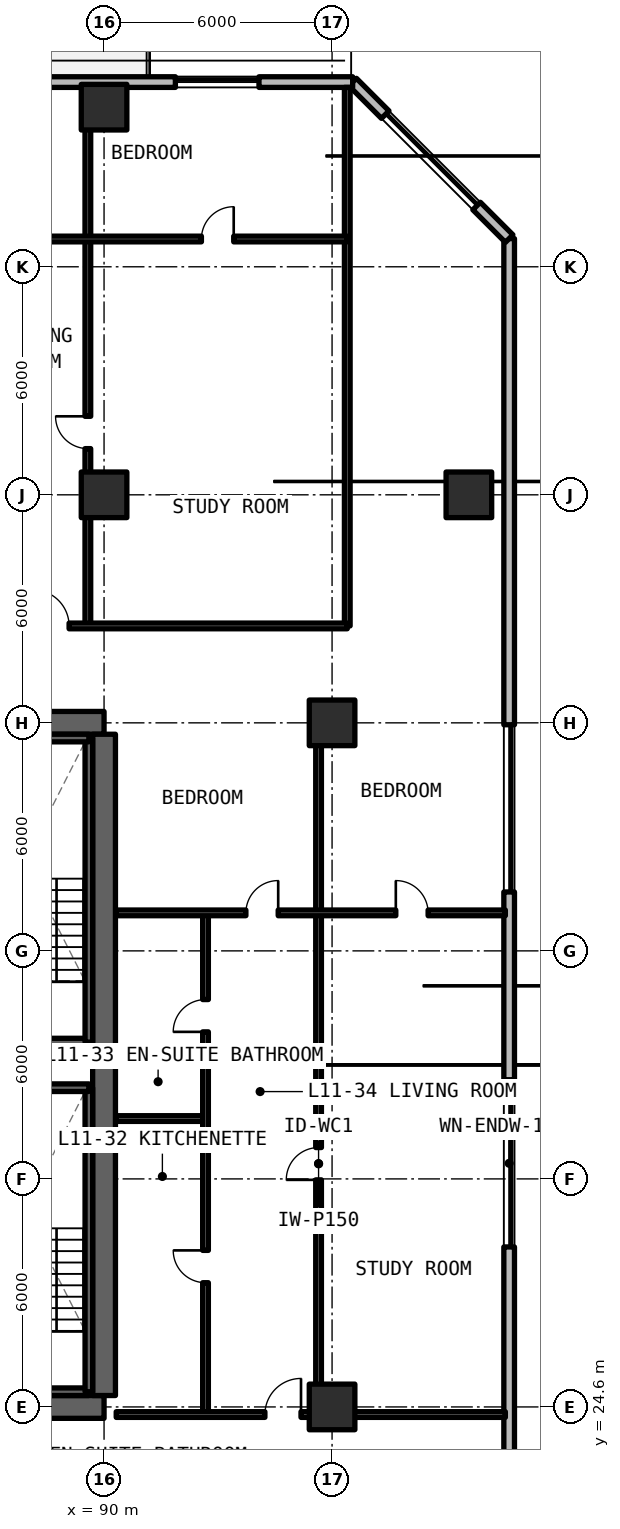
"""IFC4 building model, lengths in metres.
Left out: names, types, materials, properties, quantities, classifications, styles, units other than length and angle.
Written with IfcOpenShell. Run it as: python <this file> out.ifc"""

import sys

from ifc_helpers import new_model, si_unit, direction, frame, frame_2d, origin, origin_2d, place, context, subcontext, project, spatial, rectangle, extrude, element, fill, save


model = new_model("IFC4")
c1 = context("Model", 3, precision=1e-05, world=origin(), true_north=direction((0.0, 1.0)))
c2 = subcontext(c1, "Body", "Model", "MODEL_VIEW")
j1 = project(units=[si_unit("LENGTHUNIT", "METRE"), si_unit("PLANEANGLEUNIT", "RADIAN")], contexts=[c1])
p1 = place(None, origin())
s1 = spatial("IfcSite", under=j1, at=p1, CompositionType="ELEMENT")
p2 = place(p1, origin())
s2 = spatial("IfcBuilding", under=s1, at=p2, CompositionType="ELEMENT")
p3 = place(p2, frame((0.0, 0.0, 42.24)))
s3 = spatial("IfcBuildingStorey", under=s2, at=p3, CompositionType="ELEMENT", Elevation=42.24)
for number, where, z_axis, x_axis in (
    (1, (78.0, 24.6, 0.0), (0.0, 0.0, 1.0), (1.0, 0.0, 0.0)),
    (2, (90.0, 42.6, 0.0), (0.0, 0.0, 1.0), (-1.0, 0.0, 0.0)),
):
    element("IfcWall", number, at=place(p3, frame(where, z_axis=z_axis, x_axis=x_axis)), inside=s3, PredefinedType="SHEAR", context=c2, shape_type="SweptSolid", body=[
        extrude(rectangle(XDim=12.0, YDim=0.6, at=frame_2d((6.0, 0.0))), origin(), (0.0, 0.0, 1.0), 3.3),
    ])
p4 = place(p3, frame((90.0, 24.9, 0.0), z_axis=(0.0, 0.0, 1.0), x_axis=(0.0, 1.0, 0.0)))
e3 = element("IfcWall", 3, at=p4, inside=s3, PredefinedType="SHEAR", context=c2, shape_type="SweptSolid", body=[
    extrude(rectangle(XDim=17.4, YDim=0.6, at=frame_2d((8.7, 0.0))), origin(), (0.0, 0.0, 1.0), 3.3),
])
for number, where, z_axis, x_axis in (
    (4, (96.0, 24.6, 0.0), (0.0, 0.0, 1.0), (1.0, 0.0, 0.0)),
    (5, (96.0, 42.6, 0.0), (0.0, 0.0, 1.0), (1.0, 0.0, 0.0)),
    (6, (90.0, 48.6, 0.0), (0.0, 0.0, 1.0), (1.0, 0.0, 0.0)),
    (7, (99.6, 48.6, 0.0), (0.0, 0.0, 1.0), (1.0, 0.0, 0.0)),
    (8, (90.0, 58.8, 0.0), (0.0, 0.0, 1.0), (1.0, 0.0, 0.0)),
):
    element("IfcColumn", number, at=place(p3, frame(where, z_axis=z_axis, x_axis=x_axis)), inside=s3, PredefinedType="COLUMN", context=c2, shape_type="SweptSolid", body=[
        extrude(rectangle(XDim=1.2, YDim=1.2, at=origin_2d()), origin(), (0.0, 0.0, 1.0), 3.3),
    ])
p5 = place(p3, frame((100.66, 11.858, 0.0), z_axis=(0.0, 0.0, 1.0), x_axis=(0.0, 1.0, 0.0)))
e9 = element("IfcWall", 9, at=p5, inside=s3, PredefinedType="SOLIDWALL", context=c2, shape_type="SweptSolid", body=[
    extrude(rectangle(XDim=43.484, YDim=0.28, at=frame_2d((21.742, 0.0))), origin(), (0.0, 0.0, 1.0), 3.08),
])
p6 = place(p5, frame((16.952, 0.0, 0.78)))
e10 = element("IfcOpeningElement", 10, at=p6, cuts=e9, PredefinedType="OPENING", context=c2, shape_type="SweptSolid", body=[
    extrude(rectangle(XDim=4.4, YDim=1.66, at=frame_2d((2.2, 0.83))), frame((0.0, 0.15, 0.0), z_axis=(0.0, -1.0, 0.0), x_axis=(1.0, 0.0, 0.0)), (0.0, 0.0, 1.0), 0.3),
])
p7 = place(p5, frame((26.292, 0.0, 0.78)))
e11 = element("IfcOpeningElement", 11, at=p7, cuts=e9, PredefinedType="OPENING", context=c2, shape_type="SweptSolid", body=[
    extrude(rectangle(XDim=4.4, YDim=1.66, at=frame_2d((2.2, 0.83))), frame((0.0, 0.15, 0.0), z_axis=(0.0, -1.0, 0.0), x_axis=(1.0, 0.0, 0.0)), (0.0, 0.0, 1.0), 0.3),
])
p8 = place(p5, frame((1.511, 0.0, 0.78)))
e12 = element("IfcOpeningElement", 12, at=p8, cuts=e9, PredefinedType="OPENING", context=c2, shape_type="SweptSolid", body=[
    extrude(rectangle(XDim=4.4, YDim=1.66, at=frame_2d((2.2, 0.83))), frame((0.0, 0.15, 0.0), z_axis=(0.0, -1.0, 0.0), x_axis=(1.0, 0.0, 0.0)), (0.0, 0.0, 1.0), 0.3),
])
p9 = place(p3, frame((100.66, 55.342, 0.0), z_axis=(0.0, 0.0, 1.0), x_axis=(-0.707106781187, 0.707106781187, 0.0)))
e13 = element("IfcWall", 13, at=p9, inside=s3, PredefinedType="SOLIDWALL", context=c2, shape_type="SweptSolid", body=[
    extrude(rectangle(XDim=5.824, YDim=0.28, at=frame_2d((2.912, 0.0))), origin(), (0.0, 0.0, 1.0), 3.08),
])
p10 = place(p9, frame((1.212, 0.0, 0.78)))
e14 = element("IfcOpeningElement", 14, at=p10, cuts=e13, PredefinedType="OPENING", context=c2, shape_type="SweptSolid", body=[
    extrude(rectangle(XDim=3.4, YDim=1.66, at=frame_2d((1.7, 0.83))), frame((0.0, 0.15, 0.0), z_axis=(0.0, -1.0, 0.0), x_axis=(1.0, 0.0, 0.0)), (0.0, 0.0, 1.0), 0.3),
])
p11 = place(p3, frame((96.542, 59.46, 0.0), z_axis=(0.0, 0.0, 1.0), x_axis=(-1.0, 0.0, 0.0)))
e15 = element("IfcWall", 15, at=p11, inside=s3, PredefinedType="SOLIDWALL", context=c2, shape_type="SweptSolid", body=[
    extrude(rectangle(XDim=44.402, YDim=0.28, at=frame_2d((22.201, 0.0))), origin(), (0.0, 0.0, 1.0), 3.08),
])
p12 = place(p11, frame((33.342, 0.0, 0.0)))
e16 = element("IfcOpeningElement", 16, at=p12, cuts=e15, PredefinedType="OPENING", context=c2, shape_type="SweptSolid", body=[
    extrude(rectangle(XDim=1.1, YDim=2.15, at=frame_2d((0.55, 1.075))), frame((0.0, 0.15, 0.0), z_axis=(0.0, -1.0, 0.0), x_axis=(1.0, 0.0, 0.0)), (0.0, 0.0, 1.0), 0.3),
])
p13 = place(p11, frame((20.992, 0.0, 0.0)))
e17 = element("IfcOpeningElement", 17, at=p13, cuts=e15, PredefinedType="OPENING", context=c2, shape_type="SweptSolid", body=[
    extrude(rectangle(XDim=1.1, YDim=2.15, at=frame_2d((0.55, 1.075))), frame((0.0, 0.15, 0.0), z_axis=(0.0, -1.0, 0.0), x_axis=(1.0, 0.0, 0.0)), (0.0, 0.0, 1.0), 0.3),
])
p14 = place(p11, frame((9.392, 0.0, 0.0)))
e18 = element("IfcOpeningElement", 18, at=p14, cuts=e15, PredefinedType="OPENING", context=c2, shape_type="SweptSolid", body=[
    extrude(rectangle(XDim=1.1, YDim=2.15, at=frame_2d((0.55, 1.075))), frame((0.0, 0.15, 0.0), z_axis=(0.0, -1.0, 0.0), x_axis=(1.0, 0.0, 0.0)), (0.0, 0.0, 1.0), 0.3),
])
p15 = place(p11, frame((31.389, 0.0, 0.78)))
e19 = element("IfcOpeningElement", 19, at=p15, cuts=e15, PredefinedType="OPENING", context=c2, shape_type="SweptSolid", body=[
    extrude(rectangle(XDim=0.85, YDim=1.65, at=frame_2d((0.425, 0.825))), frame((0.0, 0.15, 0.0), z_axis=(0.0, -1.0, 0.0), x_axis=(1.0, 0.0, 0.0)), (0.0, 0.0, 1.0), 0.3),
])
p16 = place(p11, frame((25.408, 0.0, 0.78)))
e20 = element("IfcOpeningElement", 20, at=p16, cuts=e15, PredefinedType="OPENING", context=c2, shape_type="SweptSolid", body=[
    extrude(rectangle(XDim=2.2, YDim=1.66, at=frame_2d((1.1, 0.83))), frame((0.0, 0.15, 0.0), z_axis=(0.0, -1.0, 0.0), x_axis=(1.0, 0.0, 0.0)), (0.0, 0.0, 1.0), 0.3),
])
p17 = place(p11, frame((2.465, 0.0, 0.78)))
e21 = element("IfcOpeningElement", 21, at=p17, cuts=e15, PredefinedType="OPENING", context=c2, shape_type="SweptSolid", body=[
    extrude(rectangle(XDim=2.2, YDim=1.66, at=frame_2d((1.1, 0.83))), frame((0.0, 0.15, 0.0), z_axis=(0.0, -1.0, 0.0), x_axis=(1.0, 0.0, 0.0)), (0.0, 0.0, 1.0), 0.3),
])
p18 = place(p3, frame((95.645, 24.4, 0.0), z_axis=(0.0, 0.0, 1.0), x_axis=(0.0, 1.0, 0.0)))
e22 = element("IfcWall", 22, at=p18, inside=s3, PredefinedType="PARTITIONING", context=c2, shape_type="SweptSolid", body=[
    extrude(rectangle(XDim=13.2, YDim=0.15, at=frame_2d((6.6, 0.0))), origin(), (0.0, 0.0, 1.0), 2.35),
])
p19 = place(p18, frame((6.175, 0.0, 0.0)))
e23 = element("IfcOpeningElement", 23, at=p19, cuts=e22, PredefinedType="OPENING", context=c2, shape_type="SweptSolid", body=[
    extrude(rectangle(XDim=0.85, YDim=2.1, at=frame_2d((0.425, 1.05))), frame((0.0, 0.085, 0.0), z_axis=(0.0, -1.0, 0.0), x_axis=(1.0, 0.0, 0.0)), (0.0, 0.0, 1.0), 0.17),
])
p20 = place(p3, frame((90.32, 32.188, 0.0), z_axis=(0.0, 0.0, 1.0), x_axis=(1.0, 0.0, 0.0)))
e24 = element("IfcWall", 24, at=p20, inside=s3, PredefinedType="PARTITIONING", context=c2, shape_type="SweptSolid", body=[
    extrude(rectangle(XDim=2.35, YDim=0.15, at=frame_2d((1.175, 0.0))), origin(), (0.0, 0.0, 1.0), 2.35),
])
p21 = place(p3, frame((92.67, 24.4, 0.0), z_axis=(0.0, 0.0, 1.0), x_axis=(0.0, 1.0, 0.0)))
e25 = element("IfcWall", 25, at=p21, inside=s3, PredefinedType="PARTITIONING", context=c2, shape_type="SweptSolid", body=[
    extrude(rectangle(XDim=13.2, YDim=0.15, at=frame_2d((6.6, 0.0))), origin(), (0.0, 0.0, 1.0), 2.35),
])
p22 = place(p21, frame((3.469, 0.0, 0.0)))
e26 = element("IfcOpeningElement", 26, at=p22, cuts=e25, PredefinedType="OPENING", context=c2, shape_type="SweptSolid", body=[
    extrude(rectangle(XDim=0.85, YDim=2.1, at=frame_2d((0.425, 1.05))), frame((0.0, 0.085, 0.0), z_axis=(0.0, -1.0, 0.0), x_axis=(1.0, 0.0, 0.0)), (0.0, 0.0, 1.0), 0.17),
])
p23 = place(p21, frame((10.069, 0.0, 0.0)))
e27 = element("IfcOpeningElement", 27, at=p23, cuts=e25, PredefinedType="OPENING", context=c2, shape_type="SweptSolid", body=[
    extrude(rectangle(XDim=0.85, YDim=2.1, at=frame_2d((0.425, 1.05))), frame((0.0, 0.085, 0.0), z_axis=(0.0, -1.0, 0.0), x_axis=(1.0, 0.0, 0.0)), (0.0, 0.0, 1.0), 0.17),
])
p24 = place(p3, frame((95.645, 37.6, 0.0), z_axis=(0.0, 0.0, 1.0), x_axis=(0.0, 1.0, 0.0)))
e28 = element("IfcWall", 28, at=p24, inside=s3, PredefinedType="PARTITIONING", context=c2, shape_type="SweptSolid", body=[
    extrude(rectangle(XDim=5.2, YDim=0.15, at=frame_2d((2.6, 0.0))), origin(), (0.0, 0.0, 1.0), 2.35),
])
p25 = place(p3, frame((90.32, 37.6, 0.0), z_axis=(0.0, 0.0, 1.0), x_axis=(1.0, 0.0, 0.0)))
e29 = element("IfcWall", 29, at=p25, inside=s3, PredefinedType="PARTITIONING", context=c2, shape_type="SweptSolid", body=[
    extrude(rectangle(XDim=10.24, YDim=0.15, at=frame_2d((5.12, 0.0))), origin(), (0.0, 0.0, 1.0), 2.35),
])
p26 = place(p25, frame((3.412, 0.0, 0.0)))
e30 = element("IfcOpeningElement", 30, at=p26, cuts=e29, PredefinedType="OPENING", context=c2, shape_type="SweptSolid", body=[
    extrude(rectangle(XDim=0.85, YDim=2.1, at=frame_2d((0.425, 1.05))), frame((0.0, 0.085, 0.0), z_axis=(0.0, -1.0, 0.0), x_axis=(1.0, 0.0, 0.0)), (0.0, 0.0, 1.0), 0.17),
])
p27 = place(p25, frame((7.357, 0.0, 0.0)))
e31 = element("IfcOpeningElement", 31, at=p27, cuts=e29, PredefinedType="OPENING", context=c2, shape_type="SweptSolid", body=[
    extrude(rectangle(XDim=0.85, YDim=2.1, at=frame_2d((0.425, 1.05))), frame((0.0, 0.085, 0.0), z_axis=(0.0, -1.0, 0.0), x_axis=(1.0, 0.0, 0.0)), (0.0, 0.0, 1.0), 0.17),
])
p28 = place(p3, frame((90.32, 24.4, 0.0), z_axis=(0.0, 0.0, 1.0), x_axis=(1.0, 0.0, 0.0)))
e32 = element("IfcWall", 32, at=p28, inside=s3, PredefinedType="SOLIDWALL", context=c2, shape_type="SweptSolid", body=[
    extrude(rectangle(XDim=10.24, YDim=0.15, at=frame_2d((5.12, 0.0))), origin(), (0.0, 0.0, 1.0), 2.295),
])
p29 = place(p28, frame((3.913, 0.0, 0.0)))
e33 = element("IfcOpeningElement", 33, at=p29, cuts=e32, PredefinedType="OPENING", context=c2, shape_type="SweptSolid", body=[
    extrude(rectangle(XDim=0.95, YDim=2.15, at=frame_2d((0.475, 1.075))), frame((0.0, 0.085, 0.0), z_axis=(0.0, -1.0, 0.0), x_axis=(1.0, 0.0, 0.0)), (0.0, 0.0, 1.0), 0.17),
])
p30 = place(p3, frame((96.4, 45.15, 0.0), z_axis=(0.0, 0.0, 1.0), x_axis=(0.0, 1.0, 0.0)))
e34 = element("IfcWall", 34, at=p30, inside=s3, PredefinedType="SOLIDWALL", context=c2, shape_type="SweptSolid", body=[
    extrude(rectangle(XDim=14.17, YDim=0.15, at=frame_2d((7.085, 0.0))), origin(), (0.0, 0.0, 1.0), 2.35),
])
p31 = place(p3, frame((89.574, 45.15, 0.0), z_axis=(0.0, 0.0, 1.0), x_axis=(0.0, 1.0, 0.0)))
e35 = element("IfcWall", 35, at=p31, inside=s3, PredefinedType="PARTITIONING", context=c2, shape_type="SweptSolid", body=[
    extrude(rectangle(XDim=10.181, YDim=0.15, at=frame_2d((5.09, 0.0))), origin(), (0.0, 0.0, 1.0), 2.35),
])
p32 = place(p31, frame((4.666, 0.0, 0.0)))
e36 = element("IfcOpeningElement", 36, at=p32, cuts=e35, PredefinedType="OPENING", context=c2, shape_type="SweptSolid", body=[
    extrude(rectangle(XDim=0.85, YDim=2.1, at=frame_2d((0.425, 1.05))), frame((0.0, 0.085, 0.0), z_axis=(0.0, -1.0, 0.0), x_axis=(1.0, 0.0, 0.0)), (0.0, 0.0, 1.0), 0.17),
])
p33 = place(p3, frame((89.574, 55.331, 0.0), z_axis=(0.0, 0.0, 1.0), x_axis=(0.0, 1.0, 0.0)))
e37 = element("IfcWall", 37, at=p33, inside=s3, PredefinedType="PARTITIONING", context=c2, shape_type="SweptSolid", body=[
    extrude(rectangle(XDim=3.989, YDim=0.15, at=frame_2d((1.995, 0.0))), origin(), (0.0, 0.0, 1.0), 2.35),
])
p34 = place(p3, frame((82.179, 55.331, 0.0), z_axis=(0.0, 0.0, 1.0), x_axis=(1.0, 0.0, 0.0)))
e38 = element("IfcWall", 38, at=p34, inside=s3, PredefinedType="PARTITIONING", context=c2, shape_type="SweptSolid", body=[
    extrude(rectangle(XDim=14.221, YDim=0.15, at=frame_2d((7.111, 0.0))), origin(), (0.0, 0.0, 1.0), 2.35),
])
p35 = place(p34, frame((5.143, 0.0, 0.0)))
e39 = element("IfcOpeningElement", 39, at=p35, cuts=e38, PredefinedType="OPENING", context=c2, shape_type="SweptSolid", body=[
    extrude(rectangle(XDim=0.85, YDim=2.1, at=frame_2d((0.425, 1.05))), frame((0.0, 0.085, 0.0), z_axis=(0.0, -1.0, 0.0), x_axis=(1.0, 0.0, 0.0)), (0.0, 0.0, 1.0), 0.17),
])
p36 = place(p34, frame((10.383, 0.0, 0.0)))
e40 = element("IfcOpeningElement", 40, at=p36, cuts=e38, PredefinedType="OPENING", context=c2, shape_type="SweptSolid", body=[
    extrude(rectangle(XDim=0.85, YDim=2.1, at=frame_2d((0.425, 1.05))), frame((0.0, 0.085, 0.0), z_axis=(0.0, -1.0, 0.0), x_axis=(1.0, 0.0, 0.0)), (0.0, 0.0, 1.0), 0.17),
])
p37 = place(p3, frame((82.179, 45.15, 0.0), z_axis=(0.0, 0.0, 1.0), x_axis=(1.0, 0.0, 0.0)))
e41 = element("IfcWall", 41, at=p37, inside=s3, PredefinedType="SOLIDWALL", context=c2, shape_type="SweptSolid", body=[
    extrude(rectangle(XDim=14.221, YDim=0.15, at=frame_2d((7.111, 0.0))), origin(), (0.0, 0.0, 1.0), 2.35),
])
p38 = place(p37, frame((5.951, 0.0, 0.0)))
e42 = element("IfcOpeningElement", 42, at=p38, cuts=e41, PredefinedType="OPENING", context=c2, shape_type="SweptSolid", body=[
    extrude(rectangle(XDim=0.95, YDim=2.15, at=frame_2d((0.475, 1.075))), frame((0.0, 0.085, 0.0), z_axis=(0.0, -1.0, 0.0), x_axis=(1.0, 0.0, 0.0)), (0.0, 0.0, 1.0), 0.17),
])
p39 = place(p3, frame((86.2, 25.0, 0.0), z_axis=(0.0, 0.0, 1.0), x_axis=(1.0, 0.0, 0.0)))
e43 = element("IfcWall", 43, at=p39, inside=s3, PredefinedType="SOLIDWALL", context=c2, shape_type="SweptSolid", body=[
    extrude(rectangle(XDim=3.4, YDim=0.2, at=frame_2d((1.7, 0.0))), origin(), (0.0, 0.0, 1.0), 3.3),
])
p40 = place(p3, frame((89.6, 25.0, 0.0), z_axis=(0.0, 0.0, 1.0), x_axis=(0.0, 1.0, 0.0)))
e44 = element("IfcWall", 44, at=p40, inside=s3, PredefinedType="SOLIDWALL", context=c2, shape_type="SweptSolid", body=[
    extrude(rectangle(XDim=8.0, YDim=0.2, at=frame_2d((4.0, 0.0))), origin(), (0.0, 0.0, 1.0), 3.3),
])
for number, where, z_axis, x_axis in (
    (45, (89.6, 33.0, 0.0), (0.0, 0.0, 1.0), (-1.0, 0.0, 0.0)),
    (46, (86.2, 34.2, 0.0), (0.0, 0.0, 1.0), (1.0, 0.0, 0.0)),
):
    element("IfcWall", number, at=place(p3, frame(where, z_axis=z_axis, x_axis=x_axis)), inside=s3, PredefinedType="SOLIDWALL", context=c2, shape_type="SweptSolid", body=[
        extrude(rectangle(XDim=3.4, YDim=0.2, at=frame_2d((1.7, 0.0))), origin(), (0.0, 0.0, 1.0), 3.3),
    ])
p41 = place(p3, frame((89.6, 34.2, 0.0), z_axis=(0.0, 0.0, 1.0), x_axis=(0.0, 1.0, 0.0)))
e47 = element("IfcWall", 47, at=p41, inside=s3, PredefinedType="SOLIDWALL", context=c2, shape_type="SweptSolid", body=[
    extrude(rectangle(XDim=8.0, YDim=0.2, at=frame_2d((4.0, 0.0))), origin(), (0.0, 0.0, 1.0), 3.3),
])
p42 = place(p3, frame((89.6, 42.2, 0.0), z_axis=(0.0, 0.0, 1.0), x_axis=(-1.0, 0.0, 0.0)))
e48 = element("IfcWall", 48, at=p42, inside=s3, PredefinedType="SOLIDWALL", context=c2, shape_type="SweptSolid", body=[
    extrude(rectangle(XDim=3.4, YDim=0.2, at=frame_2d((1.7, 0.0))), origin(), (0.0, 0.0, 1.0), 3.3),
])
p43 = place(p6, origin())
e49 = element("IfcWindow", 49, at=p43, inside=s3, PartitioningType="SINGLE_PANEL", PredefinedType="WINDOW", context=c2, shape_type="SweptSolid", body=[
    extrude(rectangle(XDim=4.4, YDim=1.66, at=frame_2d((2.2, 0.83))), frame((0.0, 0.03, 0.0), z_axis=(0.0, -1.0, 0.0), x_axis=(1.0, 0.0, 0.0)), (0.0, 0.0, 1.0), 0.06),
])
fill(e10, e49)
p44 = place(p7, origin())
e50 = element("IfcWindow", 50, at=p44, inside=s3, PartitioningType="SINGLE_PANEL", PredefinedType="WINDOW", context=c2, shape_type="SweptSolid", body=[
    extrude(rectangle(XDim=4.4, YDim=1.66, at=frame_2d((2.2, 0.83))), frame((0.0, 0.03, 0.0), z_axis=(0.0, -1.0, 0.0), x_axis=(1.0, 0.0, 0.0)), (0.0, 0.0, 1.0), 0.06),
])
fill(e11, e50)
p45 = place(p10, origin())
e51 = element("IfcWindow", 51, at=p45, inside=s3, PartitioningType="SINGLE_PANEL", PredefinedType="WINDOW", context=c2, shape_type="SweptSolid", body=[
    extrude(rectangle(XDim=3.4, YDim=1.66, at=frame_2d((1.7, 0.83))), frame((0.0, 0.03, 0.0), z_axis=(0.0, -1.0, 0.0), x_axis=(1.0, 0.0, 0.0)), (0.0, 0.0, 1.0), 0.06),
])
fill(e14, e51)
p46 = place(p17, origin())
e52 = element("IfcWindow", 52, at=p46, inside=s3, PartitioningType="SINGLE_PANEL", PredefinedType="WINDOW", context=c2, shape_type="SweptSolid", body=[
    extrude(rectangle(XDim=2.2, YDim=1.66, at=frame_2d((1.1, 0.83))), frame((0.0, 0.03, 0.0), z_axis=(0.0, -1.0, 0.0), x_axis=(1.0, 0.0, 0.0)), (0.0, 0.0, 1.0), 0.06),
])
fill(e21, e52)
p47 = place(p19, origin())
e53 = element("IfcDoor", 53, at=p47, inside=s3, OperationType="SINGLE_SWING_LEFT", PredefinedType="DOOR", context=c2, shape_type="SweptSolid", body=[
    extrude(rectangle(XDim=0.85, YDim=2.1, at=frame_2d((0.425, 1.05))), frame((0.0, 0.025, 0.0), z_axis=(0.0, -1.0, 0.0), x_axis=(1.0, 0.0, 0.0)), (0.0, 0.0, 1.0), 0.05),
])
fill(e23, e53)
p48 = place(p22, origin())
e54 = element("IfcDoor", 54, at=p48, inside=s3, OperationType="SINGLE_SWING_RIGHT", PredefinedType="DOOR", context=c2, shape_type="SweptSolid", body=[
    extrude(rectangle(XDim=0.85, YDim=2.1, at=frame_2d((0.425, 1.05))), frame((0.0, 0.025, 0.0), z_axis=(0.0, -1.0, 0.0), x_axis=(1.0, 0.0, 0.0)), (0.0, 0.0, 1.0), 0.05),
])
fill(e26, e54)
p49 = place(p23, origin())
e55 = element("IfcDoor", 55, at=p49, inside=s3, OperationType="SINGLE_SWING_LEFT", PredefinedType="DOOR", context=c2, shape_type="SweptSolid", body=[
    extrude(rectangle(XDim=0.85, YDim=2.1, at=frame_2d((0.425, 1.05))), frame((0.0, 0.025, 0.0), z_axis=(0.0, -1.0, 0.0), x_axis=(1.0, 0.0, 0.0)), (0.0, 0.0, 1.0), 0.05),
])
fill(e27, e55)
p50 = place(p26, origin())
e56 = element("IfcDoor", 56, at=p50, inside=s3, OperationType="SINGLE_SWING_RIGHT", PredefinedType="DOOR", context=c2, shape_type="SweptSolid", body=[
    extrude(rectangle(XDim=0.85, YDim=2.1, at=frame_2d((0.425, 1.05))), frame((0.0, 0.025, 0.0), z_axis=(0.0, -1.0, 0.0), x_axis=(1.0, 0.0, 0.0)), (0.0, 0.0, 1.0), 0.05),
])
fill(e30, e56)
p51 = place(p27, origin())
e57 = element("IfcDoor", 57, at=p51, inside=s3, OperationType="SINGLE_SWING_LEFT", PredefinedType="DOOR", context=c2, shape_type="SweptSolid", body=[
    extrude(rectangle(XDim=0.85, YDim=2.1, at=frame_2d((0.425, 1.05))), frame((0.0, 0.025, 0.0), z_axis=(0.0, -1.0, 0.0), x_axis=(1.0, 0.0, 0.0)), (0.0, 0.0, 1.0), 0.05),
])
fill(e31, e57)
p52 = place(p29, origin())
e58 = element("IfcDoor", 58, at=p52, inside=s3, OperationType="SINGLE_SWING_RIGHT", PredefinedType="DOOR", context=c2, shape_type="SweptSolid", body=[
    extrude(rectangle(XDim=0.95, YDim=2.15, at=frame_2d((0.475, 1.075))), frame((0.0, 0.025, 0.0), z_axis=(0.0, -1.0, 0.0), x_axis=(1.0, 0.0, 0.0)), (0.0, 0.0, 1.0), 0.05),
])
fill(e33, e58)
p53 = place(p32, origin())
e59 = element("IfcDoor", 59, at=p53, inside=s3, OperationType="SINGLE_SWING_RIGHT", PredefinedType="DOOR", context=c2, shape_type="SweptSolid", body=[
    extrude(rectangle(XDim=0.85, YDim=2.1, at=frame_2d((0.425, 1.05))), frame((0.0, 0.025, 0.0), z_axis=(0.0, -1.0, 0.0), x_axis=(1.0, 0.0, 0.0)), (0.0, 0.0, 1.0), 0.05),
])
fill(e36, e59)
p54 = place(p36, origin())
e60 = element("IfcDoor", 60, at=p54, inside=s3, OperationType="SINGLE_SWING_RIGHT", PredefinedType="DOOR", context=c2, shape_type="SweptSolid", body=[
    extrude(rectangle(XDim=0.85, YDim=2.1, at=frame_2d((0.425, 1.05))), frame((0.0, 0.025, 0.0), z_axis=(0.0, -1.0, 0.0), x_axis=(1.0, 0.0, 0.0)), (0.0, 0.0, 1.0), 0.05),
])
fill(e40, e60)
p55 = place(p38, origin())
e61 = element("IfcDoor", 61, at=p55, inside=s3, OperationType="SINGLE_SWING_LEFT", PredefinedType="DOOR", context=c2, shape_type="SweptSolid", body=[
    extrude(rectangle(XDim=0.95, YDim=2.15, at=frame_2d((0.475, 1.075))), frame((0.0, 0.025, 0.0), z_axis=(0.0, -1.0, 0.0), x_axis=(1.0, 0.0, 0.0)), (0.0, 0.0, 1.0), 0.05),
])
fill(e42, e61)
save(model, sys.argv[1])
